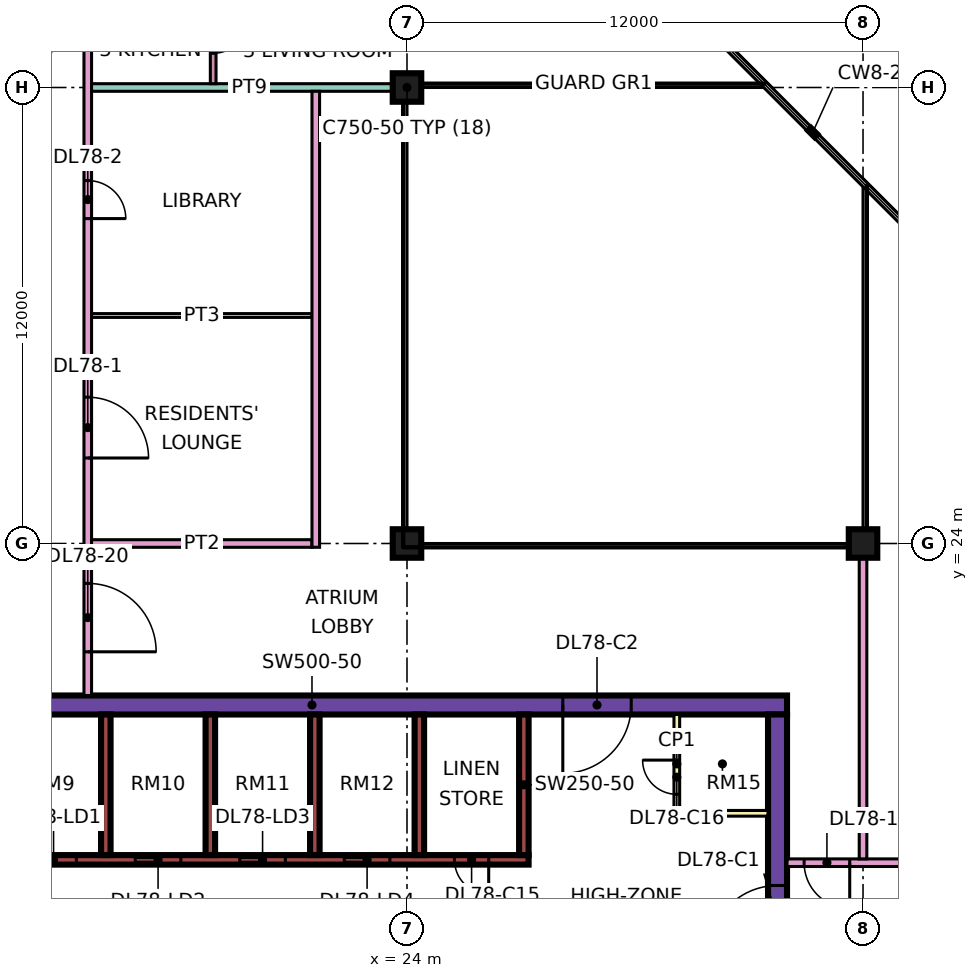
"""IFC4 building model, lengths in metres.
Left out: names, types, materials, properties, quantities, classifications, styles, units other than length and angle.
Written with IfcOpenShell. Run it as: python <this file> out.ifc"""

import sys

from ifc_helpers import new_model, si_unit, direction, frame, frame_2d, origin, origin_2d, place, context, subcontext, project, spatial, rectangle, extrude, element, fill, save


model = new_model("IFC4")
c1 = context("Model", 3, precision=1e-05, world=origin(), true_north=direction((0.0, 1.0)))
c2 = subcontext(c1, "Body", "Model", "MODEL_VIEW")
j1 = project(units=[si_unit("LENGTHUNIT", "METRE"), si_unit("PLANEANGLEUNIT", "RADIAN")], contexts=[c1])
p1 = place(None, origin())
s1 = spatial("IfcSite", under=j1, at=p1, CompositionType="ELEMENT")
p2 = place(p1, origin())
s2 = spatial("IfcBuilding", under=s1, at=p2, CompositionType="ELEMENT")
p3 = place(p2, frame((0.0, 0.0, 338.9)))
s3 = spatial("IfcBuildingStorey", under=s2, at=p3, CompositionType="ELEMENT", Elevation=338.9)
for number, where, z_axis, x_axis in (
    (1, (24.0, 24.0, 0.0), (0.0, 0.0, 1.0), (1.0, 0.0, 0.0)),
    (2, (24.0, 36.0, 0.0), (0.0, 0.0, 1.0), (1.0, 0.0, 0.0)),
    (3, (36.0, 24.0, 0.0), (0.0, 0.0, 1.0), (1.0, 0.0, 0.0)),
):
    element("IfcColumn", number, at=place(p3, frame(where, z_axis=z_axis, x_axis=x_axis)), inside=s3, PredefinedType="COLUMN", context=c2, shape_type="SweptSolid", body=[
        extrude(rectangle(XDim=0.75, YDim=0.75, at=origin_2d()), origin(), (0.0, 0.0, 1.0), 3.75),
    ])
p4 = place(p3, frame((9.0, 19.75, 0.0), z_axis=(0.0, 0.0, 1.0), x_axis=(1.0, 0.0, 0.0)))
e4 = element("IfcWall", 4, at=p4, inside=s3, PredefinedType="SHEAR", context=c2, shape_type="SweptSolid", body=[
    extrude(rectangle(XDim=25.0, YDim=0.5, at=frame_2d((12.5, 0.0))), origin(), (0.0, 0.0, 1.0), 3.75),
])
p5 = place(p4, frame((19.1, 0.0, 0.0)))
e5 = element("IfcOpeningElement", 5, at=p5, cuts=e4, PredefinedType="OPENING", context=c2, shape_type="SweptSolid", body=[
    extrude(rectangle(XDim=1.8, YDim=2.4, at=frame_2d((0.9, 1.2))), frame((0.0, 0.26, 0.0), z_axis=(0.0, -1.0, 0.0), x_axis=(1.0, 0.0, 0.0)), (0.0, 0.0, 1.0), 0.52),
])
p6 = place(p3, frame((33.75, 7.5, 0.0), z_axis=(0.0, 0.0, 1.0), x_axis=(0.0, 1.0, 0.0)))
e6 = element("IfcWall", 6, at=p6, inside=s3, PredefinedType="SHEAR", context=c2, shape_type="SweptSolid", body=[
    extrude(rectangle(XDim=12.0, YDim=0.5, at=frame_2d((6.0, 0.0))), origin(), (0.0, 0.0, 1.0), 3.75),
])
p7 = place(p6, frame((5.7, 0.0, 0.0)))
e7 = element("IfcOpeningElement", 7, at=p7, cuts=e6, PredefinedType="OPENING", context=c2, shape_type="SweptSolid", body=[
    extrude(rectangle(XDim=1.8, YDim=2.4, at=frame_2d((0.9, 1.2))), frame((0.0, 0.26, 0.0), z_axis=(0.0, -1.0, 0.0), x_axis=(1.0, 0.0, 0.0)), (0.0, 0.0, 1.0), 0.52),
])
p8 = place(p3, frame((13.45, 15.675, 0.0), z_axis=(0.0, 0.0, 1.0), x_axis=(1.0, 0.0, 0.0)))
e8 = element("IfcWall", 8, at=p8, inside=s3, PredefinedType="SHEAR", context=c2, shape_type="SweptSolid", body=[
    extrude(rectangle(XDim=13.75, YDim=0.25, at=frame_2d((6.875, 0.0))), origin(), (0.0, 0.0, 1.0), 3.75),
])
p9 = place(p8, frame((0.65, 0.0, 0.0)))
e9 = element("IfcOpeningElement", 9, at=p9, cuts=e8, PredefinedType="OPENING", context=c2, shape_type="SweptSolid", body=[
    extrude(rectangle(XDim=1.2, YDim=2.2, at=frame_2d((0.6, 1.1))), frame((0.0, 0.135, 0.0), z_axis=(0.0, -1.0, 0.0), x_axis=(1.0, 0.0, 0.0)), (0.0, 0.0, 1.0), 0.27),
])
p10 = place(p8, frame((3.4, 0.0, 0.0)))
e10 = element("IfcOpeningElement", 10, at=p10, cuts=e8, PredefinedType="OPENING", context=c2, shape_type="SweptSolid", body=[
    extrude(rectangle(XDim=1.2, YDim=2.2, at=frame_2d((0.6, 1.1))), frame((0.0, 0.135, 0.0), z_axis=(0.0, -1.0, 0.0), x_axis=(1.0, 0.0, 0.0)), (0.0, 0.0, 1.0), 0.27),
])
p11 = place(p8, frame((6.15, 0.0, 0.0)))
e11 = element("IfcOpeningElement", 11, at=p11, cuts=e8, PredefinedType="OPENING", context=c2, shape_type="SweptSolid", body=[
    extrude(rectangle(XDim=1.2, YDim=2.2, at=frame_2d((0.6, 1.1))), frame((0.0, 0.135, 0.0), z_axis=(0.0, -1.0, 0.0), x_axis=(1.0, 0.0, 0.0)), (0.0, 0.0, 1.0), 0.27),
])
p12 = place(p8, frame((8.9, 0.0, 0.0)))
e12 = element("IfcOpeningElement", 12, at=p12, cuts=e8, PredefinedType="OPENING", context=c2, shape_type="SweptSolid", body=[
    extrude(rectangle(XDim=1.2, YDim=2.2, at=frame_2d((0.6, 1.1))), frame((0.0, 0.135, 0.0), z_axis=(0.0, -1.0, 0.0), x_axis=(1.0, 0.0, 0.0)), (0.0, 0.0, 1.0), 0.27),
])
p13 = place(p8, frame((11.8, 0.0, 0.0)))
e13 = element("IfcOpeningElement", 13, at=p13, cuts=e8, PredefinedType="OPENING", context=c2, shape_type="SweptSolid", body=[
    extrude(rectangle(XDim=0.9, YDim=2.1, at=frame_2d((0.45, 1.05))), frame((0.0, 0.135, 0.0), z_axis=(0.0, -1.0, 0.0), x_axis=(1.0, 0.0, 0.0)), (0.0, 0.0, 1.0), 0.27),
])
for number, where, z_axis, x_axis in (
    (14, (16.075, 15.8, 0.0), (0.0, 0.0, 1.0), (0.0, 1.0, 0.0)),
    (15, (18.825, 15.8, 0.0), (0.0, 0.0, 1.0), (0.0, 1.0, 0.0)),
    (16, (21.575, 15.8, 0.0), (0.0, 0.0, 1.0), (0.0, 1.0, 0.0)),
    (17, (24.325, 15.8, 0.0), (0.0, 0.0, 1.0), (0.0, 1.0, 0.0)),
    (18, (27.075, 15.8, 0.0), (0.0, 0.0, 1.0), (0.0, 1.0, 0.0)),
):
    element("IfcWall", number, at=place(p3, frame(where, z_axis=z_axis, x_axis=x_axis)), inside=s3, PredefinedType="SHEAR", context=c2, shape_type="SweptSolid", body=[
        extrude(rectangle(XDim=3.7, YDim=0.25, at=frame_2d((1.85, 0.0))), origin(), (0.0, 0.0, 1.0), 3.75),
    ])
p14 = place(p3, frame((31.1, 16.9, 0.0), z_axis=(0.0, 0.0, 1.0), x_axis=(0.0, 1.0, 0.0)))
e19 = element("IfcWall", 19, at=p14, inside=s3, PredefinedType="PARTITIONING", context=c2, shape_type="SweptSolid", body=[
    extrude(rectangle(XDim=2.6, YDim=0.15, at=frame_2d((1.3, 0.0))), origin(), (0.0, 0.0, 1.0), 3.35),
])
p15 = place(p14, frame((0.5, 0.0, 0.0)))
e20 = element("IfcOpeningElement", 20, at=p15, cuts=e19, PredefinedType="OPENING", context=c2, shape_type="SweptSolid", body=[
    extrude(rectangle(XDim=0.9, YDim=2.1, at=frame_2d((0.45, 1.05))), frame((0.0, 0.085, 0.0), z_axis=(0.0, -1.0, 0.0), x_axis=(1.0, 0.0, 0.0)), (0.0, 0.0, 1.0), 0.17),
])
p16 = place(p3, frame((31.1, 16.9, 0.0), z_axis=(0.0, 0.0, 1.0), x_axis=(1.0, 0.0, 0.0)))
e21 = element("IfcWall", 21, at=p16, inside=s3, PredefinedType="PARTITIONING", context=c2, shape_type="SweptSolid", body=[
    extrude(rectangle(XDim=2.4, YDim=0.15, at=frame_2d((1.2, 0.0))), origin(), (0.0, 0.0, 1.0), 3.35),
])
p17 = place(p3, frame((15.6, 20.0, 0.0), z_axis=(0.0, 0.0, 1.0), x_axis=(0.0, 1.0, 0.0)))
e22 = element("IfcWall", 22, at=p17, inside=s3, PredefinedType="PARTITIONING", context=c2, shape_type="SweptSolid", body=[
    extrude(rectangle(XDim=27.775, YDim=0.2, at=frame_2d((13.887, 0.0))), origin(), (0.0, 0.0, 1.0), 3.35),
])
p18 = place(p17, frame((6.25, 0.0, 0.0)))
e23 = element("IfcOpeningElement", 23, at=p18, cuts=e22, PredefinedType="OPENING", context=c2, shape_type="SweptSolid", body=[
    extrude(rectangle(XDim=1.6, YDim=2.1, at=frame_2d((0.8, 1.05))), frame((0.0, 0.11, 0.0), z_axis=(0.0, -1.0, 0.0), x_axis=(1.0, 0.0, 0.0)), (0.0, 0.0, 1.0), 0.22),
])
p19 = place(p17, frame((12.55, 0.0, 0.0)))
e24 = element("IfcOpeningElement", 24, at=p19, cuts=e22, PredefinedType="OPENING", context=c2, shape_type="SweptSolid", body=[
    extrude(rectangle(XDim=1.0, YDim=2.1, at=frame_2d((0.5, 1.05))), frame((0.0, 0.11, 0.0), z_axis=(0.0, -1.0, 0.0), x_axis=(1.0, 0.0, 0.0)), (0.0, 0.0, 1.0), 0.22),
])
p20 = place(p17, frame((22.9, 0.0, 0.0)))
e25 = element("IfcOpeningElement", 25, at=p20, cuts=e22, PredefinedType="OPENING", context=c2, shape_type="SweptSolid", body=[
    extrude(rectangle(XDim=1.0, YDim=2.1, at=frame_2d((0.5, 1.05))), frame((0.0, 0.11, 0.0), z_axis=(0.0, -1.0, 0.0), x_axis=(1.0, 0.0, 0.0)), (0.0, 0.0, 1.0), 0.22),
])
p21 = place(p17, frame((1.15, 0.0, 0.0)))
e26 = element("IfcOpeningElement", 26, at=p21, cuts=e22, PredefinedType="OPENING", context=c2, shape_type="SweptSolid", body=[
    extrude(rectangle(XDim=1.8, YDim=2.1, at=frame_2d((0.9, 1.05))), frame((0.0, 0.11, 0.0), z_axis=(0.0, -1.0, 0.0), x_axis=(1.0, 0.0, 0.0)), (0.0, 0.0, 1.0), 0.22),
])
p22 = place(p17, frame((25.9, 0.0, 0.0)))
e27 = element("IfcOpeningElement", 27, at=p22, cuts=e22, PredefinedType="OPENING", context=c2, shape_type="SweptSolid", body=[
    extrude(rectangle(XDim=1.0, YDim=2.1, at=frame_2d((0.5, 1.05))), frame((0.0, 0.11, 0.0), z_axis=(0.0, -1.0, 0.0), x_axis=(1.0, 0.0, 0.0)), (0.0, 0.0, 1.0), 0.22),
])
p23 = place(p3, frame((15.7, 24.0, 0.0), z_axis=(0.0, 0.0, 1.0), x_axis=(1.0, 0.0, 0.0)))
e28 = element("IfcWall", 28, at=p23, inside=s3, PredefinedType="PARTITIONING", context=c2, shape_type="SweptSolid", body=[
    extrude(rectangle(XDim=5.8, YDim=0.2, at=frame_2d((2.9, 0.0))), origin(), (0.0, 0.0, 1.0), 3.35),
])
p24 = place(p3, frame((15.7, 30.0, 0.0), z_axis=(0.0, 0.0, 1.0), x_axis=(1.0, 0.0, 0.0)))
e29 = element("IfcWall", 29, at=p24, inside=s3, PredefinedType="PARTITIONING", context=c2, shape_type="SweptSolid", body=[
    extrude(rectangle(XDim=5.8, YDim=0.1, at=frame_2d((2.9, 0.0))), origin(), (0.0, 0.0, 1.0), 3.35),
])
p25 = place(p3, frame((15.7, 36.0, 0.0), z_axis=(0.0, 0.0, 1.0), x_axis=(1.0, 0.0, 0.0)))
e30 = element("IfcWall", 30, at=p25, inside=s3, PredefinedType="PARTITIONING", context=c2, shape_type="SweptSolid", body=[
    extrude(rectangle(XDim=8.3, YDim=0.2, at=frame_2d((4.15, 0.0))), origin(), (0.0, 0.0, 1.0), 3.35),
])
p26 = place(p3, frame((18.9, 36.1, 0.0), z_axis=(0.0, 0.0, 1.0), x_axis=(0.0, 1.0, 0.0)))
e31 = element("IfcWall", 31, at=p26, inside=s3, PredefinedType="PARTITIONING", context=c2, shape_type="SweptSolid", body=[
    extrude(rectangle(XDim=5.675, YDim=0.15, at=frame_2d((2.837, 0.0))), origin(), (0.0, 0.0, 1.0), 3.35),
])
p27 = place(p26, frame((0.8, 0.0, 0.0)))
e32 = element("IfcOpeningElement", 32, at=p27, cuts=e31, PredefinedType="OPENING", context=c2, shape_type="SweptSolid", body=[
    extrude(rectangle(XDim=0.9, YDim=2.1, at=frame_2d((0.45, 1.05))), frame((0.0, 0.085, 0.0), z_axis=(0.0, -1.0, 0.0), x_axis=(1.0, 0.0, 0.0)), (0.0, 0.0, 1.0), 0.17),
])
p28 = place(p3, frame((21.6, 23.9, 0.0), z_axis=(0.0, 0.0, 1.0), x_axis=(0.0, 1.0, 0.0)))
e33 = element("IfcWall", 33, at=p28, inside=s3, PredefinedType="PARTITIONING", context=c2, shape_type="SweptSolid", body=[
    extrude(rectangle(XDim=12.0, YDim=0.2, at=frame_2d((6.0, 0.0))), origin(), (0.0, 0.0, 1.0), 3.35),
])
p29 = place(p3, frame((34.0, 15.6, 0.0), z_axis=(0.0, 0.0, 1.0), x_axis=(1.0, 0.0, 0.0)))
e34 = element("IfcWall", 34, at=p29, inside=s3, PredefinedType="PARTITIONING", context=c2, shape_type="SweptSolid", body=[
    extrude(rectangle(XDim=10.35, YDim=0.2, at=frame_2d((5.175, 0.0))), origin(), (0.0, 0.0, 1.0), 3.35),
])
p30 = place(p29, frame((5.6, 0.0, 0.0)))
e35 = element("IfcOpeningElement", 35, at=p30, cuts=e34, PredefinedType="OPENING", context=c2, shape_type="SweptSolid", body=[
    extrude(rectangle(XDim=1.0, YDim=2.1, at=frame_2d((0.5, 1.05))), frame((0.0, 0.11, 0.0), z_axis=(0.0, -1.0, 0.0), x_axis=(1.0, 0.0, 0.0)), (0.0, 0.0, 1.0), 0.22),
])
p31 = place(p29, frame((0.45, 0.0, 0.0)))
e36 = element("IfcOpeningElement", 36, at=p31, cuts=e34, PredefinedType="OPENING", context=c2, shape_type="SweptSolid", body=[
    extrude(rectangle(XDim=1.2, YDim=2.1, at=frame_2d((0.6, 1.05))), frame((0.0, 0.11, 0.0), z_axis=(0.0, -1.0, 0.0), x_axis=(1.0, 0.0, 0.0)), (0.0, 0.0, 1.0), 0.22),
])
p32 = place(p3, frame((36.0, 15.7, 0.0), z_axis=(0.0, 0.0, 1.0), x_axis=(0.0, 1.0, 0.0)))
e37 = element("IfcWall", 37, at=p32, inside=s3, PredefinedType="PARTITIONING", context=c2, shape_type="SweptSolid", body=[
    extrude(rectangle(XDim=8.3, YDim=0.2, at=frame_2d((4.15, 0.0))), origin(), (0.0, 0.0, 1.0), 3.35),
])
p33 = place(p9, origin())
e38 = element("IfcDoor", 38, at=p33, inside=s3, OperationType="DOUBLE_DOOR_SLIDING", PredefinedType="DOOR", context=c2, shape_type="SweptSolid", body=[
    extrude(rectangle(XDim=1.2, YDim=2.2, at=frame_2d((0.6, 1.1))), frame((0.0, 0.025, 0.0), z_axis=(0.0, -1.0, 0.0), x_axis=(1.0, 0.0, 0.0)), (0.0, 0.0, 1.0), 0.05),
])
fill(e9, e38)
p34 = place(p10, origin())
e39 = element("IfcDoor", 39, at=p34, inside=s3, OperationType="DOUBLE_DOOR_SLIDING", PredefinedType="DOOR", context=c2, shape_type="SweptSolid", body=[
    extrude(rectangle(XDim=1.2, YDim=2.2, at=frame_2d((0.6, 1.1))), frame((0.0, 0.025, 0.0), z_axis=(0.0, -1.0, 0.0), x_axis=(1.0, 0.0, 0.0)), (0.0, 0.0, 1.0), 0.05),
])
fill(e10, e39)
p35 = place(p11, origin())
e40 = element("IfcDoor", 40, at=p35, inside=s3, OperationType="DOUBLE_DOOR_SLIDING", PredefinedType="DOOR", context=c2, shape_type="SweptSolid", body=[
    extrude(rectangle(XDim=1.2, YDim=2.2, at=frame_2d((0.6, 1.1))), frame((0.0, 0.025, 0.0), z_axis=(0.0, -1.0, 0.0), x_axis=(1.0, 0.0, 0.0)), (0.0, 0.0, 1.0), 0.05),
])
fill(e11, e40)
p36 = place(p12, origin())
e41 = element("IfcDoor", 41, at=p36, inside=s3, OperationType="DOUBLE_DOOR_SLIDING", PredefinedType="DOOR", context=c2, shape_type="SweptSolid", body=[
    extrude(rectangle(XDim=1.2, YDim=2.2, at=frame_2d((0.6, 1.1))), frame((0.0, 0.025, 0.0), z_axis=(0.0, -1.0, 0.0), x_axis=(1.0, 0.0, 0.0)), (0.0, 0.0, 1.0), 0.05),
])
fill(e12, e41)
p37 = place(p7, origin())
e42 = element("IfcDoor", 42, at=p37, inside=s3, OperationType="DOUBLE_DOOR_SINGLE_SWING", PredefinedType="DOOR", context=c2, shape_type="SweptSolid", body=[
    extrude(rectangle(XDim=1.8, YDim=2.4, at=frame_2d((0.9, 1.2))), frame((0.0, 0.025, 0.0), z_axis=(0.0, -1.0, 0.0), x_axis=(1.0, 0.0, 0.0)), (0.0, 0.0, 1.0), 0.05),
])
fill(e7, e42)
p38 = place(p5, frame((1.8, 0.0, 0.0), z_axis=(0.0, 0.0, 1.0), x_axis=(-1.0, 0.0, 0.0)))
e43 = element("IfcDoor", 43, at=p38, inside=s3, OperationType="DOUBLE_DOOR_SINGLE_SWING", PredefinedType="DOOR", context=c2, shape_type="SweptSolid", body=[
    extrude(rectangle(XDim=1.8, YDim=2.4, at=frame_2d((0.9, 1.2))), frame((0.0, 0.025, 0.0), z_axis=(0.0, -1.0, 0.0), x_axis=(1.0, 0.0, 0.0)), (0.0, 0.0, 1.0), 0.05),
])
fill(e5, e43)
p39 = place(p13, origin())
e44 = element("IfcDoor", 44, at=p39, inside=s3, OperationType="SINGLE_SWING_RIGHT", PredefinedType="DOOR", context=c2, shape_type="SweptSolid", body=[
    extrude(rectangle(XDim=0.9, YDim=2.1, at=frame_2d((0.45, 1.05))), frame((0.0, 0.025, 0.0), z_axis=(0.0, -1.0, 0.0), x_axis=(1.0, 0.0, 0.0)), (0.0, 0.0, 1.0), 0.05),
])
fill(e13, e44)
p40 = place(p15, frame((0.9, 0.0, 0.0), z_axis=(0.0, 0.0, 1.0), x_axis=(-1.0, 0.0, 0.0)))
e45 = element("IfcDoor", 45, at=p40, inside=s3, OperationType="SINGLE_SWING_RIGHT", PredefinedType="DOOR", context=c2, shape_type="SweptSolid", body=[
    extrude(rectangle(XDim=0.9, YDim=2.1, at=frame_2d((0.45, 1.05))), frame((0.0, 0.025, 0.0), z_axis=(0.0, -1.0, 0.0), x_axis=(1.0, 0.0, 0.0)), (0.0, 0.0, 1.0), 0.05),
])
fill(e20, e45)
p41 = place(p18, frame((1.6, 0.0, 0.0), z_axis=(0.0, 0.0, 1.0), x_axis=(-1.0, 0.0, 0.0)))
e46 = element("IfcDoor", 46, at=p41, inside=s3, OperationType="DOUBLE_DOOR_SINGLE_SWING", PredefinedType="DOOR", context=c2, shape_type="SweptSolid", body=[
    extrude(rectangle(XDim=1.6, YDim=2.1, at=frame_2d((0.8, 1.05))), frame((0.0, 0.025, 0.0), z_axis=(0.0, -1.0, 0.0), x_axis=(1.0, 0.0, 0.0)), (0.0, 0.0, 1.0), 0.05),
])
fill(e23, e46)
p42 = place(p19, frame((1.0, 0.0, 0.0), z_axis=(0.0, 0.0, 1.0), x_axis=(-1.0, 0.0, 0.0)))
e47 = element("IfcDoor", 47, at=p42, inside=s3, OperationType="SINGLE_SWING_LEFT", PredefinedType="DOOR", context=c2, shape_type="SweptSolid", body=[
    extrude(rectangle(XDim=1.0, YDim=2.1, at=frame_2d((0.5, 1.05))), frame((0.0, 0.025, 0.0), z_axis=(0.0, -1.0, 0.0), x_axis=(1.0, 0.0, 0.0)), (0.0, 0.0, 1.0), 0.05),
])
fill(e24, e47)
p43 = place(p27, origin())
e48 = element("IfcDoor", 48, at=p43, inside=s3, OperationType="SINGLE_SWING_RIGHT", PredefinedType="DOOR", context=c2, shape_type="SweptSolid", body=[
    extrude(rectangle(XDim=0.9, YDim=2.1, at=frame_2d((0.45, 1.05))), frame((0.0, 0.025, 0.0), z_axis=(0.0, -1.0, 0.0), x_axis=(1.0, 0.0, 0.0)), (0.0, 0.0, 1.0), 0.05),
])
fill(e32, e48)
p44 = place(p31, origin())
e49 = element("IfcDoor", 49, at=p44, inside=s3, OperationType="SINGLE_SWING_RIGHT", PredefinedType="DOOR", context=c2, shape_type="SweptSolid", body=[
    extrude(rectangle(XDim=1.2, YDim=2.1, at=frame_2d((0.6, 1.05))), frame((0.0, 0.025, 0.0), z_axis=(0.0, -1.0, 0.0), x_axis=(1.0, 0.0, 0.0)), (0.0, 0.0, 1.0), 0.05),
])
fill(e36, e49)
p45 = place(p21, frame((1.8, 0.0, 0.0), z_axis=(0.0, 0.0, 1.0), x_axis=(-1.0, 0.0, 0.0)))
e50 = element("IfcDoor", 50, at=p45, inside=s3, OperationType="DOUBLE_DOOR_SINGLE_SWING", PredefinedType="DOOR", context=c2, shape_type="SweptSolid", body=[
    extrude(rectangle(XDim=1.8, YDim=2.1, at=frame_2d((0.9, 1.05))), frame((0.0, 0.025, 0.0), z_axis=(0.0, -1.0, 0.0), x_axis=(1.0, 0.0, 0.0)), (0.0, 0.0, 1.0), 0.05),
])
fill(e26, e50)
save(model, sys.argv[1])
